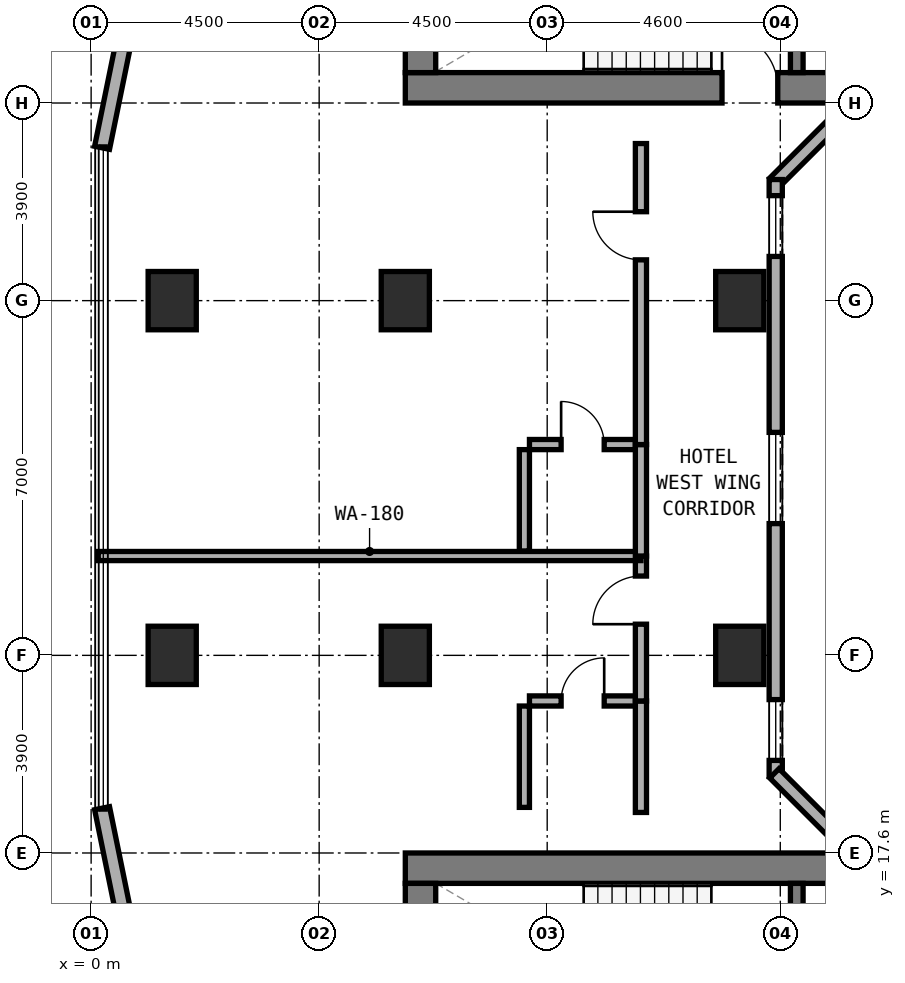
"""IFC4 building model, lengths in metres.
Left out: names, types, materials, properties, quantities, classifications, styles, units other than length and angle.
Written with IfcOpenShell. Run it as: python <this file> out.ifc"""

import sys

from ifc_helpers import new_model, si_unit, direction, frame, frame_2d, origin, origin_2d, place, context, subcontext, project, spatial, rectangle, extrude, element, fill, save


model = new_model("IFC4")
c1 = context("Model", 3, precision=1e-05, world=origin(), true_north=direction((0.0, 1.0)))
c2 = subcontext(c1, "Body", "Model", "MODEL_VIEW")
j1 = project(units=[si_unit("LENGTHUNIT", "METRE"), si_unit("PLANEANGLEUNIT", "RADIAN")], contexts=[c1])
p1 = place(None, origin())
s1 = spatial("IfcSite", under=j1, at=p1, CompositionType="ELEMENT")
p2 = place(p1, origin())
s2 = spatial("IfcBuilding", under=s1, at=p2, CompositionType="ELEMENT")
p3 = place(p2, frame((0.0, 0.0, 48.5)))
s3 = spatial("IfcBuildingStorey", under=s2, at=p3, CompositionType="ELEMENT", Elevation=48.5)
p4 = place(p3, frame((6.2, 32.7, 0.0), z_axis=(0.0, 0.0, 1.0), x_axis=(1.0, 0.0, 0.0)))
e1 = element("IfcWall", 1, at=p4, inside=s3, PredefinedType="SHEAR", context=c2, shape_type="SweptSolid", body=[
    extrude(rectangle(XDim=24.8, YDim=0.6, at=frame_2d((12.4, 0.0))), origin(), (0.0, 0.0, 1.0), 3.5),
])
p5 = place(p4, frame((6.25, 0.0, 0.0)))
e2 = element("IfcOpeningElement", 2, at=p5, cuts=e1, PredefinedType="OPENING", context=c2, shape_type="SweptSolid", body=[
    extrude(rectangle(XDim=1.1, YDim=2.15, at=frame_2d((0.55, 1.075))), frame((0.0, 0.31, 0.0), z_axis=(0.0, -1.0, 0.0), x_axis=(1.0, 0.0, 0.0)), (0.0, 0.0, 1.0), 0.62),
])
p6 = place(p3, frame((6.5, 33.0, 0.0), z_axis=(0.0, 0.0, 1.0), x_axis=(0.0, 1.0, 0.0)))
e3 = element("IfcWall", 3, at=p6, inside=s3, PredefinedType="SHEAR", context=c2, shape_type="SweptSolid", body=[
    extrude(rectangle(XDim=3.16, YDim=0.6, at=frame_2d((1.58, 0.0))), origin(), (0.0, 0.0, 1.0), 3.5),
])
p7 = place(p3, frame((13.925, 33.0, 0.0), z_axis=(0.0, 0.0, 1.0), x_axis=(0.0, 1.0, 0.0)))
e4 = element("IfcWall", 4, at=p7, inside=s3, PredefinedType="STANDARD", context=c2, shape_type="SweptSolid", body=[
    extrude(rectangle(XDim=3.16, YDim=0.25, at=frame_2d((1.58, 0.0))), origin(), (0.0, 0.0, 1.0), 3.22),
])
p8 = place(p7, frame((0.98, 0.0, 0.0)))
e5 = element("IfcOpeningElement", 5, at=p8, cuts=e4, PredefinedType="OPENING", context=c2, shape_type="SweptSolid", body=[
    extrude(rectangle(XDim=1.1, YDim=2.15, at=frame_2d((0.55, 1.075))), frame((0.0, 0.135, 0.0), z_axis=(0.0, -1.0, 0.0), x_axis=(1.0, 0.0, 0.0)), (0.0, 0.0, 1.0), 0.27),
])
p9 = place(p3, frame((6.2, 17.3, 0.0), z_axis=(0.0, 0.0, 1.0), x_axis=(1.0, 0.0, 0.0)))
e6 = element("IfcWall", 6, at=p9, inside=s3, PredefinedType="SHEAR", context=c2, shape_type="SweptSolid", body=[
    extrude(rectangle(XDim=24.8, YDim=0.6, at=frame_2d((12.4, 0.0))), origin(), (0.0, 0.0, 1.0), 3.5),
])
p10 = place(p3, frame((6.5, 13.84, 0.0), z_axis=(0.0, 0.0, 1.0), x_axis=(0.0, 1.0, 0.0)))
e7 = element("IfcWall", 7, at=p10, inside=s3, PredefinedType="SHEAR", context=c2, shape_type="SweptSolid", body=[
    extrude(rectangle(XDim=3.16, YDim=0.6, at=frame_2d((1.58, 0.0))), origin(), (0.0, 0.0, 1.0), 3.5),
])
p11 = place(p3, frame((13.925, 13.84, 0.0), z_axis=(0.0, 0.0, 1.0), x_axis=(0.0, 1.0, 0.0)))
e8 = element("IfcWall", 8, at=p11, inside=s3, PredefinedType="STANDARD", context=c2, shape_type="SweptSolid", body=[
    extrude(rectangle(XDim=3.16, YDim=0.25, at=frame_2d((1.58, 0.0))), origin(), (0.0, 0.0, 1.0), 3.22),
])
p12 = place(p11, frame((0.98, 0.0, 0.0)))
e9 = element("IfcOpeningElement", 9, at=p12, cuts=e8, PredefinedType="OPENING", context=c2, shape_type="SweptSolid", body=[
    extrude(rectangle(XDim=1.1, YDim=2.15, at=frame_2d((0.55, 1.075))), frame((0.0, 0.135, 0.0), z_axis=(0.0, -1.0, 0.0), x_axis=(1.0, 0.0, 0.0)), (0.0, 0.0, 1.0), 0.27),
])
for number, where, z_axis, x_axis in (
    (10, (6.2, 21.5, 0.0), (0.0, 0.0, 1.0), (1.0, 0.0, 0.0)),
    (11, (6.2, 28.5, 0.0), (0.0, 0.0, 1.0), (1.0, 0.0, 0.0)),
    (12, (12.8, 21.5, 0.0), (0.0, 0.0, 1.0), (1.0, 0.0, 0.0)),
    (13, (12.8, 28.5, 0.0), (0.0, 0.0, 1.0), (1.0, 0.0, 0.0)),
    (14, (1.6, 21.5, 0.0), (0.0, 0.0, 1.0), (1.0, 0.0, 0.0)),
    (15, (1.6, 28.5, 0.0), (0.0, 0.0, 1.0), (1.0, 0.0, 0.0)),
):
    element("IfcColumn", number, at=place(p3, frame(where, z_axis=z_axis, x_axis=x_axis)), inside=s3, PredefinedType="COLUMN", context=c2, shape_type="SweptSolid", body=[
        extrude(rectangle(XDim=0.95, YDim=1.15, at=origin_2d()), origin(), (0.0, 0.0, 1.0), 3.5),
    ])
p13 = place(p3, frame((2.229, 41.378, 0.0), z_axis=(0.0, 0.0, 1.0), x_axis=(-0.199990901713, -0.979797754249, 0.0)))
e16 = element("IfcWall", 16, at=p13, inside=s3, PredefinedType="STANDARD", context=c2, shape_type="SweptSolid", body=[
    extrude(rectangle(XDim=10.065, YDim=0.3, at=frame_2d((5.033, 0.0))), origin(), (0.0, 0.0, 1.0), 3.22),
])
p14 = place(p13, frame((0.378, 0.0, 0.85)))
e17 = element("IfcOpeningElement", 17, at=p14, cuts=e16, PredefinedType="OPENING", context=c2, shape_type="SweptSolid", body=[
    extrude(rectangle(XDim=1.8, YDim=1.5, at=frame_2d((0.9, 0.75))), frame((0.0, 0.16, 0.0), z_axis=(0.0, -1.0, 0.0), x_axis=(1.0, 0.0, 0.0)), (0.0, 0.0, 1.0), 0.32),
])
p15 = place(p13, frame((5.236, 0.0, 0.8)))
e18 = element("IfcOpeningElement", 18, at=p15, cuts=e16, PredefinedType="OPENING", context=c2, shape_type="SweptSolid", body=[
    extrude(rectangle(XDim=2.4, YDim=1.6, at=frame_2d((1.2, 0.8))), frame((0.0, 0.16, 0.0), z_axis=(0.0, -1.0, 0.0), x_axis=(1.0, 0.0, 0.0)), (0.0, 0.0, 1.0), 0.32),
])
p16 = place(p3, frame((0.216, 18.484, 0.0), z_axis=(0.0, 0.0, 1.0), x_axis=(0.199990901713, -0.979797754249, 0.0)))
e19 = element("IfcWall", 19, at=p16, inside=s3, PredefinedType="STANDARD", context=c2, shape_type="SweptSolid", body=[
    extrude(rectangle(XDim=10.065, YDim=0.3, at=frame_2d((5.033, 0.0))), origin(), (0.0, 0.0, 1.0), 3.22),
])
p17 = place(p16, frame((2.429, 0.0, 0.8)))
e20 = element("IfcOpeningElement", 20, at=p17, cuts=e19, PredefinedType="OPENING", context=c2, shape_type="SweptSolid", body=[
    extrude(rectangle(XDim=2.4, YDim=1.6, at=frame_2d((1.2, 0.8))), frame((0.0, 0.16, 0.0), z_axis=(0.0, -1.0, 0.0), x_axis=(1.0, 0.0, 0.0)), (0.0, 0.0, 1.0), 0.32),
])
p18 = place(p16, frame((7.887, 0.0, 0.85)))
e21 = element("IfcOpeningElement", 21, at=p18, cuts=e19, PredefinedType="OPENING", context=c2, shape_type="SweptSolid", body=[
    extrude(rectangle(XDim=1.8, YDim=1.5, at=frame_2d((0.9, 0.75))), frame((0.0, 0.16, 0.0), z_axis=(0.0, -1.0, 0.0), x_axis=(1.0, 0.0, 0.0)), (0.0, 0.0, 1.0), 0.32),
])
p19 = place(p3, frame((15.318, 32.662, 0.0), z_axis=(0.0, 0.0, 1.0), x_axis=(-0.707106781187, -0.707106781187, 0.0)))
e22 = element("IfcWall", 22, at=p19, inside=s3, PredefinedType="STANDARD", context=c2, shape_type="SweptSolid", body=[
    extrude(rectangle(XDim=2.594, YDim=0.26, at=frame_2d((1.297, 0.0))), origin(), (0.0, 0.0, 1.0), 3.22),
])
p20 = place(p3, frame((13.51, 30.89, 0.0), z_axis=(0.0, 0.0, 1.0), x_axis=(0.0, -1.0, 0.0)))
e23 = element("IfcWall", 23, at=p20, inside=s3, PredefinedType="STANDARD", context=c2, shape_type="SweptSolid", body=[
    extrude(rectangle(XDim=11.78, YDim=0.26, at=frame_2d((5.89, 0.0))), origin(), (0.0, 0.0, 1.0), 3.22),
])
p21 = place(p20, frame((0.318, 0.0, 0.85)))
e24 = element("IfcOpeningElement", 24, at=p21, cuts=e23, PredefinedType="OPENING", context=c2, shape_type="SweptSolid", body=[
    extrude(rectangle(XDim=1.2, YDim=1.5, at=frame_2d((0.6, 0.75))), frame((0.0, 0.14, 0.0), z_axis=(0.0, -1.0, 0.0), x_axis=(1.0, 0.0, 0.0)), (0.0, 0.0, 1.0), 0.28),
])
p22 = place(p20, frame((4.99, 0.0, 0.85)))
e25 = element("IfcOpeningElement", 25, at=p22, cuts=e23, PredefinedType="OPENING", context=c2, shape_type="SweptSolid", body=[
    extrude(rectangle(XDim=1.8, YDim=1.5, at=frame_2d((0.9, 0.75))), frame((0.0, 0.14, 0.0), z_axis=(0.0, -1.0, 0.0), x_axis=(1.0, 0.0, 0.0)), (0.0, 0.0, 1.0), 0.28),
])
p23 = place(p20, frame((10.263, 0.0, 0.85)))
e26 = element("IfcOpeningElement", 26, at=p23, cuts=e23, PredefinedType="OPENING", context=c2, shape_type="SweptSolid", body=[
    extrude(rectangle(XDim=1.2, YDim=1.5, at=frame_2d((0.6, 0.75))), frame((0.0, 0.14, 0.0), z_axis=(0.0, -1.0, 0.0), x_axis=(1.0, 0.0, 0.0)), (0.0, 0.0, 1.0), 0.28),
])
p24 = place(p3, frame((13.484, 19.172, 0.0), z_axis=(0.0, 0.0, 1.0), x_axis=(0.707106781187, -0.707106781187, 0.0)))
e27 = element("IfcWall", 27, at=p24, inside=s3, PredefinedType="STANDARD", context=c2, shape_type="SweptSolid", body=[
    extrude(rectangle(XDim=2.594, YDim=0.26, at=frame_2d((1.297, 0.0))), origin(), (0.0, 0.0, 1.0), 3.22),
])
p25 = place(p3, frame((8.65, 20.6, 0.0), z_axis=(0.0, 0.0, 1.0), x_axis=(1.0, 0.0, 0.0)))
e28 = element("IfcWall", 28, at=p25, inside=s3, PredefinedType="PLUMBINGWALL", context=c2, shape_type="SweptSolid", body=[
    extrude(rectangle(XDim=2.1, YDim=0.2, at=frame_2d((1.05, 0.0))), origin(), (0.0, 0.0, 1.0), 3.22),
])
p26 = place(p25, frame((0.625, 0.0, 0.0)))
e29 = element("IfcOpeningElement", 29, at=p26, cuts=e28, PredefinedType="OPENING", context=c2, shape_type="SweptSolid", body=[
    extrude(rectangle(XDim=0.85, YDim=2.1, at=frame_2d((0.425, 1.05))), frame((0.0, 0.11, 0.0), z_axis=(0.0, -1.0, 0.0), x_axis=(1.0, 0.0, 0.0)), (0.0, 0.0, 1.0), 0.22),
])
p27 = place(p3, frame((8.55, 18.5, 0.0), z_axis=(0.0, 0.0, 1.0), x_axis=(0.0, 1.0, 0.0)))
e30 = element("IfcWall", 30, at=p27, inside=s3, PredefinedType="PLUMBINGWALL", context=c2, shape_type="SweptSolid", body=[
    extrude(rectangle(XDim=2.0, YDim=0.2, at=frame_2d((1.0, 0.0))), origin(), (0.0, 0.0, 1.0), 3.22),
])
p28 = place(p3, frame((10.85, 18.4, 0.0), z_axis=(0.0, 0.0, 1.0), x_axis=(0.0, 1.0, 0.0)))
e31 = element("IfcWall", 31, at=p28, inside=s3, PredefinedType="SOLIDWALL", context=c2, shape_type="SweptSolid", body=[
    extrude(rectangle(XDim=2.2, YDim=0.22, at=frame_2d((1.1, 0.0))), origin(), (0.0, 0.0, 1.0), 3.22),
])
p29 = place(p3, frame((10.85, 20.6, 0.0), z_axis=(0.0, 0.0, 1.0), x_axis=(0.0, 1.0, 0.0)))
e32 = element("IfcWall", 32, at=p29, inside=s3, PredefinedType="SOLIDWALL", context=c2, shape_type="SweptSolid", body=[
    extrude(rectangle(XDim=2.86, YDim=0.22, at=frame_2d((1.43, 0.0))), origin(), (0.0, 0.0, 1.0), 2.395),
])
p30 = place(p29, frame((1.515, 0.0, 0.0)))
e33 = element("IfcOpeningElement", 33, at=p30, cuts=e32, PredefinedType="OPENING", context=c2, shape_type="SweptSolid", body=[
    extrude(rectangle(XDim=0.95, YDim=2.1, at=frame_2d((0.475, 1.05))), frame((0.0, 0.12, 0.0), z_axis=(0.0, -1.0, 0.0), x_axis=(1.0, 0.0, 0.0)), (0.0, 0.0, 1.0), 0.24),
])
p31 = place(p3, frame((0.14, 23.46, 0.0), z_axis=(0.0, 0.0, 1.0), x_axis=(1.0, 0.0, 0.0)))
e34 = element("IfcWall", 34, at=p31, inside=s3, PredefinedType="SOLIDWALL", context=c2, shape_type="SweptSolid", body=[
    extrude(rectangle(XDim=10.71, YDim=0.18, at=frame_2d((5.355, 0.0))), origin(), (0.0, 0.0, 1.0), 2.745),
])
p32 = place(p3, frame((8.65, 25.66, 0.0), z_axis=(0.0, 0.0, 1.0), x_axis=(1.0, 0.0, 0.0)))
e35 = element("IfcWall", 35, at=p32, inside=s3, PredefinedType="PLUMBINGWALL", context=c2, shape_type="SweptSolid", body=[
    extrude(rectangle(XDim=2.1, YDim=0.2, at=frame_2d((1.05, 0.0))), origin(), (0.0, 0.0, 1.0), 3.22),
])
p33 = place(p32, frame((0.625, 0.0, 0.0)))
e36 = element("IfcOpeningElement", 36, at=p33, cuts=e35, PredefinedType="OPENING", context=c2, shape_type="SweptSolid", body=[
    extrude(rectangle(XDim=0.85, YDim=2.1, at=frame_2d((0.425, 1.05))), frame((0.0, 0.11, 0.0), z_axis=(0.0, -1.0, 0.0), x_axis=(1.0, 0.0, 0.0)), (0.0, 0.0, 1.0), 0.22),
])
p34 = place(p3, frame((8.55, 23.56, 0.0), z_axis=(0.0, 0.0, 1.0), x_axis=(0.0, 1.0, 0.0)))
e37 = element("IfcWall", 37, at=p34, inside=s3, PredefinedType="PLUMBINGWALL", context=c2, shape_type="SweptSolid", body=[
    extrude(rectangle(XDim=2.0, YDim=0.2, at=frame_2d((1.0, 0.0))), origin(), (0.0, 0.0, 1.0), 3.22),
])
p35 = place(p3, frame((10.85, 23.46, 0.0), z_axis=(0.0, 0.0, 1.0), x_axis=(0.0, 1.0, 0.0)))
e38 = element("IfcWall", 38, at=p35, inside=s3, PredefinedType="SOLIDWALL", context=c2, shape_type="SweptSolid", body=[
    extrude(rectangle(XDim=2.2, YDim=0.22, at=frame_2d((1.1, 0.0))), origin(), (0.0, 0.0, 1.0), 3.22),
])
p36 = place(p3, frame((10.85, 25.66, 0.0), z_axis=(0.0, 0.0, 1.0), x_axis=(0.0, 1.0, 0.0)))
e39 = element("IfcWall", 39, at=p36, inside=s3, PredefinedType="SOLIDWALL", context=c2, shape_type="SweptSolid", body=[
    extrude(rectangle(XDim=5.94, YDim=0.22, at=frame_2d((2.97, 0.0))), origin(), (0.0, 0.0, 1.0), 2.395),
])
p37 = place(p36, frame((3.645, 0.0, 0.0)))
e40 = element("IfcOpeningElement", 40, at=p37, cuts=e39, PredefinedType="OPENING", context=c2, shape_type="SweptSolid", body=[
    extrude(rectangle(XDim=0.95, YDim=2.1, at=frame_2d((0.475, 1.05))), frame((0.0, 0.12, 0.0), z_axis=(0.0, -1.0, 0.0), x_axis=(1.0, 0.0, 0.0)), (0.0, 0.0, 1.0), 0.24),
])
p38 = place(p21, origin())
e41 = element("IfcWindow", 41, at=p38, inside=s3, PartitioningType="SINGLE_PANEL", PredefinedType="WINDOW", context=c2, shape_type="SweptSolid", body=[
    extrude(rectangle(XDim=1.2, YDim=1.5, at=frame_2d((0.6, 0.75))), frame((0.0, 0.03, 0.0), z_axis=(0.0, -1.0, 0.0), x_axis=(1.0, 0.0, 0.0)), (0.0, 0.0, 1.0), 0.06),
])
fill(e24, e41)
p39 = place(p22, origin())
e42 = element("IfcWindow", 42, at=p39, inside=s3, PartitioningType="SINGLE_PANEL", PredefinedType="WINDOW", context=c2, shape_type="SweptSolid", body=[
    extrude(rectangle(XDim=1.8, YDim=1.5, at=frame_2d((0.9, 0.75))), frame((0.0, 0.03, 0.0), z_axis=(0.0, -1.0, 0.0), x_axis=(1.0, 0.0, 0.0)), (0.0, 0.0, 1.0), 0.06),
])
fill(e25, e42)
p40 = place(p23, origin())
e43 = element("IfcWindow", 43, at=p40, inside=s3, PartitioningType="SINGLE_PANEL", PredefinedType="WINDOW", context=c2, shape_type="SweptSolid", body=[
    extrude(rectangle(XDim=1.2, YDim=1.5, at=frame_2d((0.6, 0.75))), frame((0.0, 0.03, 0.0), z_axis=(0.0, -1.0, 0.0), x_axis=(1.0, 0.0, 0.0)), (0.0, 0.0, 1.0), 0.06),
])
fill(e26, e43)
p41 = place(p5, origin())
e44 = element("IfcDoor", 44, at=p41, inside=s3, OperationType="SINGLE_SWING_LEFT", PredefinedType="DOOR", context=c2, shape_type="SweptSolid", body=[
    extrude(rectangle(XDim=1.1, YDim=2.15, at=frame_2d((0.55, 1.075))), frame((0.0, 0.025, 0.0), z_axis=(0.0, -1.0, 0.0), x_axis=(1.0, 0.0, 0.0)), (0.0, 0.0, 1.0), 0.05),
])
fill(e2, e44)
p42 = place(p26, origin())
e45 = element("IfcDoor", 45, at=p42, inside=s3, OperationType="SINGLE_SWING_RIGHT", PredefinedType="DOOR", context=c2, shape_type="SweptSolid", body=[
    extrude(rectangle(XDim=0.85, YDim=2.1, at=frame_2d((0.425, 1.05))), frame((0.0, 0.025, 0.0), z_axis=(0.0, -1.0, 0.0), x_axis=(1.0, 0.0, 0.0)), (0.0, 0.0, 1.0), 0.05),
])
fill(e29, e45)
p43 = place(p30, origin())
e46 = element("IfcDoor", 46, at=p43, inside=s3, OperationType="SINGLE_SWING_LEFT", PredefinedType="DOOR", context=c2, shape_type="SweptSolid", body=[
    extrude(rectangle(XDim=0.95, YDim=2.1, at=frame_2d((0.475, 1.05))), frame((0.0, 0.025, 0.0), z_axis=(0.0, -1.0, 0.0), x_axis=(1.0, 0.0, 0.0)), (0.0, 0.0, 1.0), 0.05),
])
fill(e33, e46)
p44 = place(p33, origin())
e47 = element("IfcDoor", 47, at=p44, inside=s3, OperationType="SINGLE_SWING_LEFT", PredefinedType="DOOR", context=c2, shape_type="SweptSolid", body=[
    extrude(rectangle(XDim=0.85, YDim=2.1, at=frame_2d((0.425, 1.05))), frame((0.0, 0.025, 0.0), z_axis=(0.0, -1.0, 0.0), x_axis=(1.0, 0.0, 0.0)), (0.0, 0.0, 1.0), 0.05),
])
fill(e36, e47)
p45 = place(p37, origin())
e48 = element("IfcDoor", 48, at=p45, inside=s3, OperationType="SINGLE_SWING_RIGHT", PredefinedType="DOOR", context=c2, shape_type="SweptSolid", body=[
    extrude(rectangle(XDim=0.95, YDim=2.1, at=frame_2d((0.475, 1.05))), frame((0.0, 0.025, 0.0), z_axis=(0.0, -1.0, 0.0), x_axis=(1.0, 0.0, 0.0)), (0.0, 0.0, 1.0), 0.05),
])
fill(e40, e48)
save(model, sys.argv[1])
